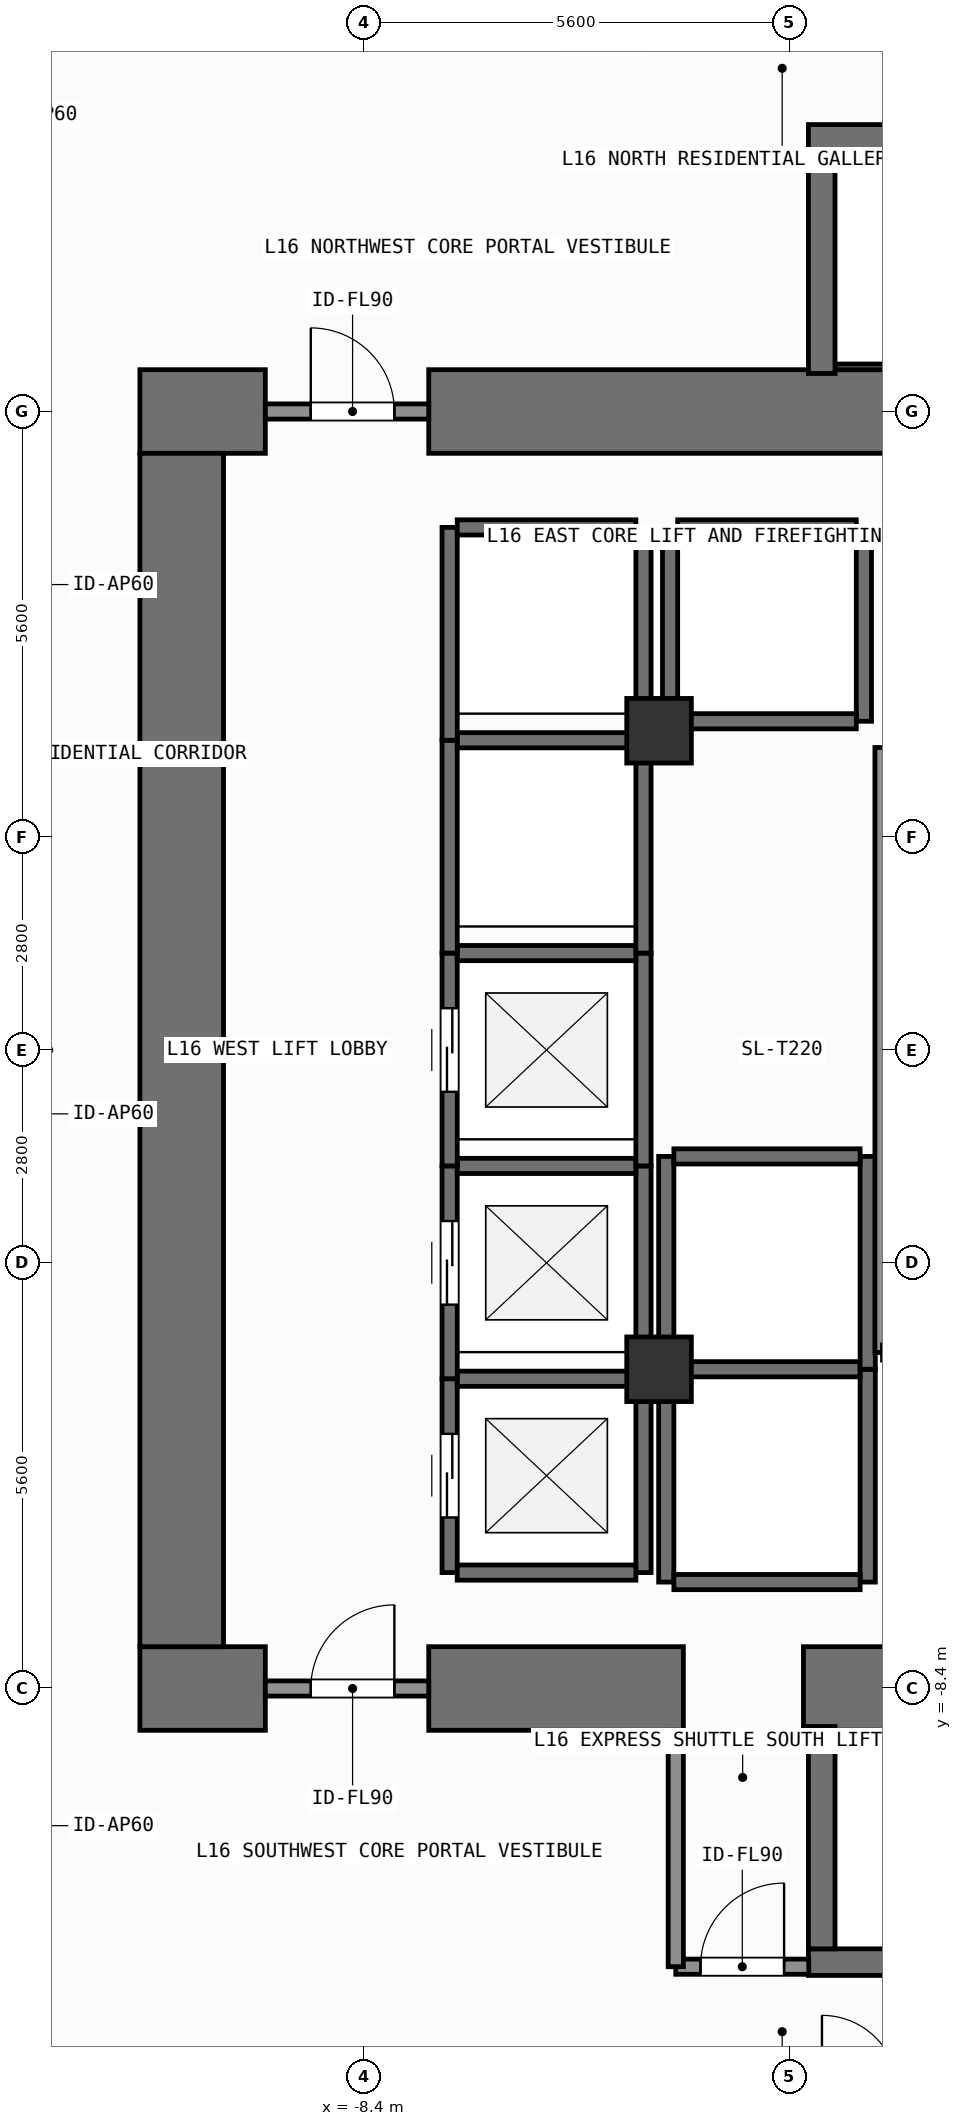
"""IFC4 building model, lengths in metres.
Left out: names, types, materials, properties, quantities, classifications, styles, units other than length and angle.
Written with IfcOpenShell. Run it as: python <this file> out.ifc"""

import sys

from ifc_helpers import new_model, si_unit, direction, frame, frame_2d, origin, origin_2d, place, context, subcontext, project, spatial, rectangle, extrude, element, fill, save


model = new_model("IFC4")
c1 = context("Model", 3, precision=1e-05, world=origin(), true_north=direction((0.0, 1.0)))
c2 = subcontext(c1, "Body", "Model", "MODEL_VIEW")
j1 = project(units=[si_unit("LENGTHUNIT", "METRE"), si_unit("PLANEANGLEUNIT", "RADIAN")], contexts=[c1])
p1 = place(None, origin())
s1 = spatial("IfcSite", under=j1, at=p1, CompositionType="ELEMENT")
p2 = place(p1, origin())
s2 = spatial("IfcBuilding", under=s1, at=p2, CompositionType="ELEMENT")
p3 = place(p2, frame((0.0, 0.0, 61.8)))
s3 = spatial("IfcBuildingStorey", under=s2, at=p3, CompositionType="ELEMENT", Elevation=61.8)
p4 = place(p3, frame((-11.35, -8.4, 0.0), z_axis=(0.0, 0.0, 1.0), x_axis=(1.0, 0.0, 0.0)))
e1 = element("IfcWall", 1, at=p4, inside=s3, PredefinedType="SHEAR", context=c2, shape_type="SweptSolid", body=[
    extrude(rectangle(XDim=1.65, YDim=1.1, at=frame_2d((0.825, 0.0))), origin(), (0.0, 0.0, 1.0), 3.9),
])
p5 = place(p3, frame((-7.55, -8.4, 0.0), z_axis=(0.0, 0.0, 1.0), x_axis=(1.0, 0.0, 0.0)))
e2 = element("IfcWall", 2, at=p5, inside=s3, PredefinedType="SHEAR", context=c2, shape_type="SweptSolid", body=[
    extrude(rectangle(XDim=3.35, YDim=1.1, at=frame_2d((1.675, 0.0))), origin(), (0.0, 0.0, 1.0), 3.9),
])
p6 = place(p3, frame((-2.62, -8.4, 0.0), z_axis=(0.0, 0.0, 1.0), x_axis=(1.0, 0.0, 0.0)))
e3 = element("IfcWall", 3, at=p6, inside=s3, PredefinedType="SHEAR", context=c2, shape_type="SweptSolid", body=[
    extrude(rectangle(XDim=7.27, YDim=1.1, at=frame_2d((3.635, 0.0))), origin(), (0.0, 0.0, 1.0), 3.9),
])
p7 = place(p3, frame((-11.35, 8.4, 0.0), z_axis=(0.0, 0.0, 1.0), x_axis=(1.0, 0.0, 0.0)))
e4 = element("IfcWall", 4, at=p7, inside=s3, PredefinedType="SHEAR", context=c2, shape_type="SweptSolid", body=[
    extrude(rectangle(XDim=1.65, YDim=1.1, at=frame_2d((0.825, 0.0))), origin(), (0.0, 0.0, 1.0), 3.9),
])
p8 = place(p3, frame((-7.55, 8.4, 0.0), z_axis=(0.0, 0.0, 1.0), x_axis=(1.0, 0.0, 0.0)))
e5 = element("IfcWall", 5, at=p8, inside=s3, PredefinedType="SHEAR", context=c2, shape_type="SweptSolid", body=[
    extrude(rectangle(XDim=16.5, YDim=1.1, at=frame_2d((8.25, 0.0))), origin(), (0.0, 0.0, 1.0), 3.9),
])
p9 = place(p3, frame((-10.8, -7.85, 0.0), z_axis=(0.0, 0.0, 1.0), x_axis=(0.0, 1.0, 0.0)))
e6 = element("IfcWall", 6, at=p9, inside=s3, PredefinedType="SHEAR", context=c2, shape_type="SweptSolid", body=[
    extrude(rectangle(XDim=15.7, YDim=1.1, at=frame_2d((7.85, 0.0))), origin(), (0.0, 0.0, 1.0), 3.9),
])
p10 = place(p3, frame((-2.555, -12.0, 0.0), z_axis=(0.0, 0.0, 1.0), x_axis=(1.0, 0.0, 0.0)))
e7 = element("IfcWall", 7, at=p10, inside=s3, PredefinedType="SHEAR", context=c2, shape_type="SweptSolid", body=[
    extrude(rectangle(XDim=7.31, YDim=0.35, at=frame_2d((3.655, 0.0))), origin(), (0.0, 0.0, 1.0), 3.9),
])
p11 = place(p3, frame((-2.2, -8.988, 0.0), z_axis=(0.0, 0.0, 1.0), x_axis=(1.0, 0.0, 0.0)))
e8 = element("IfcWall", 8, at=p11, inside=s3, PredefinedType="SHEAR", context=c2, shape_type="SweptSolid", body=[
    extrude(rectangle(XDim=6.6, YDim=0.075, at=frame_2d((3.3, 0.0))), origin(), (0.0, 0.0, 1.0), 3.9),
])
p12 = place(p3, frame((-2.38, -11.825, 0.0), z_axis=(0.0, 0.0, 1.0), x_axis=(0.0, 1.0, 0.0)))
e9 = element("IfcWall", 9, at=p12, inside=s3, PredefinedType="SHEAR", context=c2, shape_type="SweptSolid", body=[
    extrude(rectangle(XDim=2.925, YDim=0.35, at=frame_2d((1.462, 0.0))), origin(), (0.0, 0.0, 1.0), 3.9),
])
p13 = place(p3, frame((-2.555, 12.0, 0.0), z_axis=(0.0, 0.0, 1.0), x_axis=(1.0, 0.0, 0.0)))
e10 = element("IfcWall", 10, at=p13, inside=s3, PredefinedType="SHEAR", context=c2, shape_type="SweptSolid", body=[
    extrude(rectangle(XDim=7.31, YDim=0.35, at=frame_2d((3.655, 0.0))), origin(), (0.0, 0.0, 1.0), 3.9),
])
p14 = place(p3, frame((-2.2, 8.988, 0.0), z_axis=(0.0, 0.0, 1.0), x_axis=(1.0, 0.0, 0.0)))
e11 = element("IfcWall", 11, at=p14, inside=s3, PredefinedType="SHEAR", context=c2, shape_type="SweptSolid", body=[
    extrude(rectangle(XDim=6.6, YDim=0.075, at=frame_2d((3.3, 0.0))), origin(), (0.0, 0.0, 1.0), 3.9),
])
p15 = place(p3, frame((-2.38, 8.9, 0.0), z_axis=(0.0, 0.0, 1.0), x_axis=(0.0, 1.0, 0.0)))
e12 = element("IfcWall", 12, at=p15, inside=s3, PredefinedType="SHEAR", context=c2, shape_type="SweptSolid", body=[
    extrude(rectangle(XDim=2.925, YDim=0.35, at=frame_2d((1.462, 0.0))), origin(), (0.0, 0.0, 1.0), 3.9),
])
for number, where, z_axis, x_axis in (
    (13, (-4.52, -4.2, 0.0), (0.0, 0.0, 1.0), (1.0, 0.0, 0.0)),
    (14, (-4.52, 4.2, 0.0), (0.0, 0.0, 1.0), (1.0, 0.0, 0.0)),
):
    element("IfcColumn", number, at=place(p3, frame(where, z_axis=z_axis, x_axis=x_axis)), inside=s3, PredefinedType="COLUMN", context=c2, shape_type="SweptSolid", body=[
        extrude(rectangle(XDim=0.85, YDim=0.85, at=origin_2d()), origin(), (0.0, 0.0, 1.0), 3.9),
    ])
p16 = place(p3, frame((-7.275, -6.875, 0.0), z_axis=(0.0, 0.0, 1.0), x_axis=(0.0, 1.0, 0.0)))
e15 = element("IfcWall", 15, at=p16, inside=s3, PredefinedType="SHEAR", context=c2, shape_type="SweptSolid", body=[
    extrude(rectangle(XDim=2.55, YDim=0.2, at=frame_2d((1.275, 0.0))), origin(), (0.0, 0.0, 1.0), 3.68),
])
p17 = place(p16, frame((0.725, 0.0, 0.0)))
e16 = element("IfcOpeningElement", 16, at=p17, cuts=e15, PredefinedType="OPENING", context=c2, shape_type="SweptSolid", body=[
    extrude(rectangle(XDim=1.1, YDim=2.2, at=frame_2d((0.55, 1.1))), frame((0.0, 0.11, 0.0), z_axis=(0.0, -1.0, 0.0), x_axis=(1.0, 0.0, 0.0)), (0.0, 0.0, 1.0), 0.22),
])
p18 = place(p3, frame((-4.725, -6.875, 0.0), z_axis=(0.0, 0.0, 1.0), x_axis=(0.0, 1.0, 0.0)))
e17 = element("IfcWall", 17, at=p18, inside=s3, PredefinedType="SHEAR", context=c2, shape_type="SweptSolid", body=[
    extrude(rectangle(XDim=2.55, YDim=0.2, at=frame_2d((1.275, 0.0))), origin(), (0.0, 0.0, 1.0), 3.68),
])
for number, where, z_axis, x_axis in (
    (18, (-7.175, -6.875, 0.0), (0.0, 0.0, 1.0), (1.0, 0.0, 0.0)),
    (19, (-7.175, -4.325, 0.0), (0.0, 0.0, 1.0), (1.0, 0.0, 0.0)),
):
    element("IfcWall", number, at=place(p3, frame(where, z_axis=z_axis, x_axis=x_axis)), inside=s3, PredefinedType="SHEAR", context=c2, shape_type="SweptSolid", body=[
        extrude(rectangle(XDim=2.35, YDim=0.2, at=frame_2d((1.175, 0.0))), origin(), (0.0, 0.0, 1.0), 3.68),
    ])
p19 = place(p3, frame((-7.275, -4.325, 0.0), z_axis=(0.0, 0.0, 1.0), x_axis=(0.0, 1.0, 0.0)))
e20 = element("IfcWall", 20, at=p19, inside=s3, PredefinedType="SHEAR", context=c2, shape_type="SweptSolid", body=[
    extrude(rectangle(XDim=2.8, YDim=0.2, at=frame_2d((1.4, 0.0))), origin(), (0.0, 0.0, 1.0), 3.68),
])
p20 = place(p19, frame((0.975, 0.0, 0.0)))
e21 = element("IfcOpeningElement", 21, at=p20, cuts=e20, PredefinedType="OPENING", context=c2, shape_type="SweptSolid", body=[
    extrude(rectangle(XDim=1.1, YDim=2.2, at=frame_2d((0.55, 1.1))), frame((0.0, 0.11, 0.0), z_axis=(0.0, -1.0, 0.0), x_axis=(1.0, 0.0, 0.0)), (0.0, 0.0, 1.0), 0.22),
])
p21 = place(p3, frame((-4.725, -4.325, 0.0), z_axis=(0.0, 0.0, 1.0), x_axis=(0.0, 1.0, 0.0)))
e22 = element("IfcWall", 22, at=p21, inside=s3, PredefinedType="SHEAR", context=c2, shape_type="SweptSolid", body=[
    extrude(rectangle(XDim=2.8, YDim=0.2, at=frame_2d((1.4, 0.0))), origin(), (0.0, 0.0, 1.0), 3.68),
])
p22 = place(p3, frame((-7.175, -1.525, 0.0), z_axis=(0.0, 0.0, 1.0), x_axis=(1.0, 0.0, 0.0)))
e23 = element("IfcWall", 23, at=p22, inside=s3, PredefinedType="SHEAR", context=c2, shape_type="SweptSolid", body=[
    extrude(rectangle(XDim=2.35, YDim=0.2, at=frame_2d((1.175, 0.0))), origin(), (0.0, 0.0, 1.0), 3.68),
])
p23 = place(p3, frame((-7.275, -1.525, 0.0), z_axis=(0.0, 0.0, 1.0), x_axis=(0.0, 1.0, 0.0)))
e24 = element("IfcWall", 24, at=p23, inside=s3, PredefinedType="SHEAR", context=c2, shape_type="SweptSolid", body=[
    extrude(rectangle(XDim=2.8, YDim=0.2, at=frame_2d((1.4, 0.0))), origin(), (0.0, 0.0, 1.0), 3.68),
])
p24 = place(p23, frame((0.975, 0.0, 0.0)))
e25 = element("IfcOpeningElement", 25, at=p24, cuts=e24, PredefinedType="OPENING", context=c2, shape_type="SweptSolid", body=[
    extrude(rectangle(XDim=1.1, YDim=2.2, at=frame_2d((0.55, 1.1))), frame((0.0, 0.11, 0.0), z_axis=(0.0, -1.0, 0.0), x_axis=(1.0, 0.0, 0.0)), (0.0, 0.0, 1.0), 0.22),
])
p25 = place(p3, frame((-4.725, -1.525, 0.0), z_axis=(0.0, 0.0, 1.0), x_axis=(0.0, 1.0, 0.0)))
e26 = element("IfcWall", 26, at=p25, inside=s3, PredefinedType="SHEAR", context=c2, shape_type="SweptSolid", body=[
    extrude(rectangle(XDim=2.8, YDim=0.2, at=frame_2d((1.4, 0.0))), origin(), (0.0, 0.0, 1.0), 3.68),
])
p26 = place(p3, frame((-7.175, 1.275, 0.0), z_axis=(0.0, 0.0, 1.0), x_axis=(1.0, 0.0, 0.0)))
e27 = element("IfcWall", 27, at=p26, inside=s3, PredefinedType="SHEAR", context=c2, shape_type="SweptSolid", body=[
    extrude(rectangle(XDim=2.35, YDim=0.2, at=frame_2d((1.175, 0.0))), origin(), (0.0, 0.0, 1.0), 3.68),
])
for number, where, z_axis, x_axis in (
    (28, (-7.275, 1.275, 0.0), (0.0, 0.0, 1.0), (0.0, 1.0, 0.0)),
    (29, (-4.725, 1.275, 0.0), (0.0, 0.0, 1.0), (0.0, 1.0, 0.0)),
):
    element("IfcWall", number, at=place(p3, frame(where, z_axis=z_axis, x_axis=x_axis)), inside=s3, PredefinedType="SHEAR", context=c2, shape_type="SweptSolid", body=[
        extrude(rectangle(XDim=2.8, YDim=0.2, at=frame_2d((1.4, 0.0))), origin(), (0.0, 0.0, 1.0), 3.68),
    ])
p27 = place(p3, frame((-7.175, 4.075, 0.0), z_axis=(0.0, 0.0, 1.0), x_axis=(1.0, 0.0, 0.0)))
e30 = element("IfcWall", 30, at=p27, inside=s3, PredefinedType="SHEAR", context=c2, shape_type="SweptSolid", body=[
    extrude(rectangle(XDim=2.35, YDim=0.2, at=frame_2d((1.175, 0.0))), origin(), (0.0, 0.0, 1.0), 3.68),
])
for number, where, z_axis, x_axis in (
    (31, (-7.275, 4.075, 0.0), (0.0, 0.0, 1.0), (0.0, 1.0, 0.0)),
    (32, (-4.725, 4.075, 0.0), (0.0, 0.0, 1.0), (0.0, 1.0, 0.0)),
):
    element("IfcWall", number, at=place(p3, frame(where, z_axis=z_axis, x_axis=x_axis)), inside=s3, PredefinedType="SHEAR", context=c2, shape_type="SweptSolid", body=[
        extrude(rectangle(XDim=2.8, YDim=0.2, at=frame_2d((1.4, 0.0))), origin(), (0.0, 0.0, 1.0), 3.68),
    ])
p28 = place(p3, frame((-7.175, 6.875, 0.0), z_axis=(0.0, 0.0, 1.0), x_axis=(1.0, 0.0, 0.0)))
e33 = element("IfcWall", 33, at=p28, inside=s3, PredefinedType="SHEAR", context=c2, shape_type="SweptSolid", body=[
    extrude(rectangle(XDim=2.35, YDim=0.2, at=frame_2d((1.175, 0.0))), origin(), (0.0, 0.0, 1.0), 3.68),
])
for number, where, z_axis, x_axis in (
    (34, (-4.375, 4.325, 0.0), (0.0, 0.0, 1.0), (0.0, 1.0, 0.0)),
    (35, (-1.825, 4.325, 0.0), (0.0, 0.0, 1.0), (0.0, 1.0, 0.0)),
):
    element("IfcWall", number, at=place(p3, frame(where, z_axis=z_axis, x_axis=x_axis)), inside=s3, PredefinedType="SHEAR", context=c2, shape_type="SweptSolid", body=[
        extrude(rectangle(XDim=2.55, YDim=0.2, at=frame_2d((1.275, 0.0))), origin(), (0.0, 0.0, 1.0), 3.68),
    ])
for number, where, z_axis, x_axis in (
    (36, (-4.275, 4.325, 0.0), (0.0, 0.0, 1.0), (1.0, 0.0, 0.0)),
    (37, (-4.275, 6.875, 0.0), (0.0, 0.0, 1.0), (1.0, 0.0, 0.0)),
):
    element("IfcWall", number, at=place(p3, frame(where, z_axis=z_axis, x_axis=x_axis)), inside=s3, PredefinedType="SHEAR", context=c2, shape_type="SweptSolid", body=[
        extrude(rectangle(XDim=2.35, YDim=0.2, at=frame_2d((1.175, 0.0))), origin(), (0.0, 0.0, 1.0), 3.68),
    ])
for number, where, z_axis, x_axis in (
    (38, (-4.425, -7.0, 0.0), (0.0, 0.0, 1.0), (0.0, 1.0, 0.0)),
    (39, (-1.775, -7.0, 0.0), (0.0, 0.0, 1.0), (0.0, 1.0, 0.0)),
):
    element("IfcWall", number, at=place(p3, frame(where, z_axis=z_axis, x_axis=x_axis)), inside=s3, PredefinedType="SHEAR", context=c2, shape_type="SweptSolid", body=[
        extrude(rectangle(XDim=2.8, YDim=0.2, at=frame_2d((1.4, 0.0))), origin(), (0.0, 0.0, 1.0), 3.68),
    ])
for number, where, z_axis, x_axis in (
    (40, (-4.325, -7.0, 0.0), (0.0, 0.0, 1.0), (1.0, 0.0, 0.0)),
    (41, (-4.325, -4.2, 0.0), (0.0, 0.0, 1.0), (1.0, 0.0, 0.0)),
):
    element("IfcWall", number, at=place(p3, frame(where, z_axis=z_axis, x_axis=x_axis)), inside=s3, PredefinedType="SHEAR", context=c2, shape_type="SweptSolid", body=[
        extrude(rectangle(XDim=2.45, YDim=0.2, at=frame_2d((1.225, 0.0))), origin(), (0.0, 0.0, 1.0), 3.68),
    ])
for number, where, z_axis, x_axis in (
    (42, (-4.425, -4.2, 0.0), (0.0, 0.0, 1.0), (0.0, 1.0, 0.0)),
    (43, (-1.775, -4.2, 0.0), (0.0, 0.0, 1.0), (0.0, 1.0, 0.0)),
):
    element("IfcWall", number, at=place(p3, frame(where, z_axis=z_axis, x_axis=x_axis)), inside=s3, PredefinedType="SHEAR", context=c2, shape_type="SweptSolid", body=[
        extrude(rectangle(XDim=2.8, YDim=0.2, at=frame_2d((1.4, 0.0))), origin(), (0.0, 0.0, 1.0), 3.68),
    ])
p29 = place(p3, frame((-4.325, -1.4, 0.0), z_axis=(0.0, 0.0, 1.0), x_axis=(1.0, 0.0, 0.0)))
e44 = element("IfcWall", 44, at=p29, inside=s3, PredefinedType="SHEAR", context=c2, shape_type="SweptSolid", body=[
    extrude(rectangle(XDim=2.45, YDim=0.2, at=frame_2d((1.225, 0.0))), origin(), (0.0, 0.0, 1.0), 3.68),
])
p30 = place(p3, frame((-9.7, -8.4, 0.0), z_axis=(0.0, 0.0, 1.0), x_axis=(1.0, 0.0, 0.0)))
e45 = element("IfcWall", 45, at=p30, inside=s3, PredefinedType="SOLIDWALL", context=c2, shape_type="SweptSolid", body=[
    extrude(rectangle(XDim=2.15, YDim=0.2, at=frame_2d((1.075, 0.0))), origin(), (0.0, 0.0, 1.0), 2.72),
])
p31 = place(p30, frame((0.598, 0.0, 0.0)))
e46 = element("IfcOpeningElement", 46, at=p31, cuts=e45, PredefinedType="OPENING", context=c2, shape_type="SweptSolid", body=[
    extrude(rectangle(XDim=1.1, YDim=2.15, at=frame_2d((0.55, 1.075))), frame((0.0, 0.11, 0.0), z_axis=(0.0, -1.0, 0.0), x_axis=(1.0, 0.0, 0.0)), (0.0, 0.0, 1.0), 0.22),
])
p32 = place(p3, frame((-9.7, 8.4, 0.0), z_axis=(0.0, 0.0, 1.0), x_axis=(1.0, 0.0, 0.0)))
e47 = element("IfcWall", 47, at=p32, inside=s3, PredefinedType="SOLIDWALL", context=c2, shape_type="SweptSolid", body=[
    extrude(rectangle(XDim=2.15, YDim=0.2, at=frame_2d((1.075, 0.0))), origin(), (0.0, 0.0, 1.0), 2.72),
])
p33 = place(p32, frame((0.598, 0.0, 0.0)))
e48 = element("IfcOpeningElement", 48, at=p33, cuts=e47, PredefinedType="OPENING", context=c2, shape_type="SweptSolid", body=[
    extrude(rectangle(XDim=1.1, YDim=2.15, at=frame_2d((0.55, 1.075))), frame((0.0, 0.11, 0.0), z_axis=(0.0, -1.0, 0.0), x_axis=(1.0, 0.0, 0.0)), (0.0, 0.0, 1.0), 0.22),
])
p34 = place(p3, frame((-4.3, -12.06, 0.0), z_axis=(0.0, 0.0, 1.0), x_axis=(1.0, 0.0, 0.0)))
e49 = element("IfcWall", 49, at=p34, inside=s3, PredefinedType="SOLIDWALL", context=c2, shape_type="SweptSolid", body=[
    extrude(rectangle(XDim=1.75, YDim=0.2, at=frame_2d((0.875, 0.0))), origin(), (0.0, 0.0, 1.0), 3.68),
])
p35 = place(p34, frame((0.325, 0.0, 0.0)))
e50 = element("IfcOpeningElement", 50, at=p35, cuts=e49, PredefinedType="OPENING", context=c2, shape_type="SweptSolid", body=[
    extrude(rectangle(XDim=1.1, YDim=2.15, at=frame_2d((0.55, 1.075))), frame((0.0, 0.11, 0.0), z_axis=(0.0, -1.0, 0.0), x_axis=(1.0, 0.0, 0.0)), (0.0, 0.0, 1.0), 0.22),
])
p36 = place(p3, frame((-4.3, -12.06, 0.0), z_axis=(0.0, 0.0, 1.0), x_axis=(0.0, 1.0, 0.0)))
e51 = element("IfcWall", 51, at=p36, inside=s3, PredefinedType="SOLIDWALL", context=c2, shape_type="SweptSolid", body=[
    extrude(rectangle(XDim=3.11, YDim=0.2, at=frame_2d((1.555, 0.0))), origin(), (0.0, 0.0, 1.0), 3.68),
])
p37 = place(p3, frame((-1.58, -3.98, 0.0), z_axis=(0.0, 0.0, 1.0), x_axis=(0.0, 1.0, 0.0)))
e52 = element("IfcWall", 52, at=p37, inside=s3, PredefinedType="SOLIDWALL", context=c2, shape_type="SweptSolid", body=[
    extrude(rectangle(XDim=7.96, YDim=0.2, at=frame_2d((3.98, 0.0))), origin(), (0.0, 0.0, 1.0), 3.68),
])
p38 = place(p17, origin())
e53 = element("IfcDoor", 53, at=p38, inside=s3, OperationType="SLIDING_TO_LEFT", PredefinedType="DOOR", context=c2, shape_type="SweptSolid", body=[
    extrude(rectangle(XDim=1.1, YDim=2.2, at=frame_2d((0.55, 1.1))), frame((0.0, 0.025, 0.0), z_axis=(0.0, -1.0, 0.0), x_axis=(1.0, 0.0, 0.0)), (0.0, 0.0, 1.0), 0.05),
])
fill(e16, e53)
p39 = place(p20, origin())
e54 = element("IfcDoor", 54, at=p39, inside=s3, OperationType="SLIDING_TO_LEFT", PredefinedType="DOOR", context=c2, shape_type="SweptSolid", body=[
    extrude(rectangle(XDim=1.1, YDim=2.2, at=frame_2d((0.55, 1.1))), frame((0.0, 0.025, 0.0), z_axis=(0.0, -1.0, 0.0), x_axis=(1.0, 0.0, 0.0)), (0.0, 0.0, 1.0), 0.05),
])
fill(e21, e54)
p40 = place(p24, origin())
e55 = element("IfcDoor", 55, at=p40, inside=s3, OperationType="SLIDING_TO_LEFT", PredefinedType="DOOR", context=c2, shape_type="SweptSolid", body=[
    extrude(rectangle(XDim=1.1, YDim=2.2, at=frame_2d((0.55, 1.1))), frame((0.0, 0.025, 0.0), z_axis=(0.0, -1.0, 0.0), x_axis=(1.0, 0.0, 0.0)), (0.0, 0.0, 1.0), 0.05),
])
fill(e25, e55)
p41 = place(p31, origin())
e56 = element("IfcDoor", 56, at=p41, inside=s3, OperationType="SINGLE_SWING_RIGHT", PredefinedType="DOOR", context=c2, shape_type="SweptSolid", body=[
    extrude(rectangle(XDim=1.1, YDim=2.15, at=frame_2d((0.55, 1.075))), frame((0.0, 0.025, 0.0), z_axis=(0.0, -1.0, 0.0), x_axis=(1.0, 0.0, 0.0)), (0.0, 0.0, 1.0), 0.05),
])
fill(e46, e56)
p42 = place(p33, origin())
e57 = element("IfcDoor", 57, at=p42, inside=s3, OperationType="SINGLE_SWING_LEFT", PredefinedType="DOOR", context=c2, shape_type="SweptSolid", body=[
    extrude(rectangle(XDim=1.1, YDim=2.15, at=frame_2d((0.55, 1.075))), frame((0.0, 0.025, 0.0), z_axis=(0.0, -1.0, 0.0), x_axis=(1.0, 0.0, 0.0)), (0.0, 0.0, 1.0), 0.05),
])
fill(e48, e57)
p43 = place(p35, origin())
e58 = element("IfcDoor", 58, at=p43, inside=s3, OperationType="SINGLE_SWING_RIGHT", PredefinedType="DOOR", context=c2, shape_type="SweptSolid", body=[
    extrude(rectangle(XDim=1.1, YDim=2.15, at=frame_2d((0.55, 1.075))), frame((0.0, 0.025, 0.0), z_axis=(0.0, -1.0, 0.0), x_axis=(1.0, 0.0, 0.0)), (0.0, 0.0, 1.0), 0.05),
])
fill(e50, e58)
save(model, sys.argv[1])
